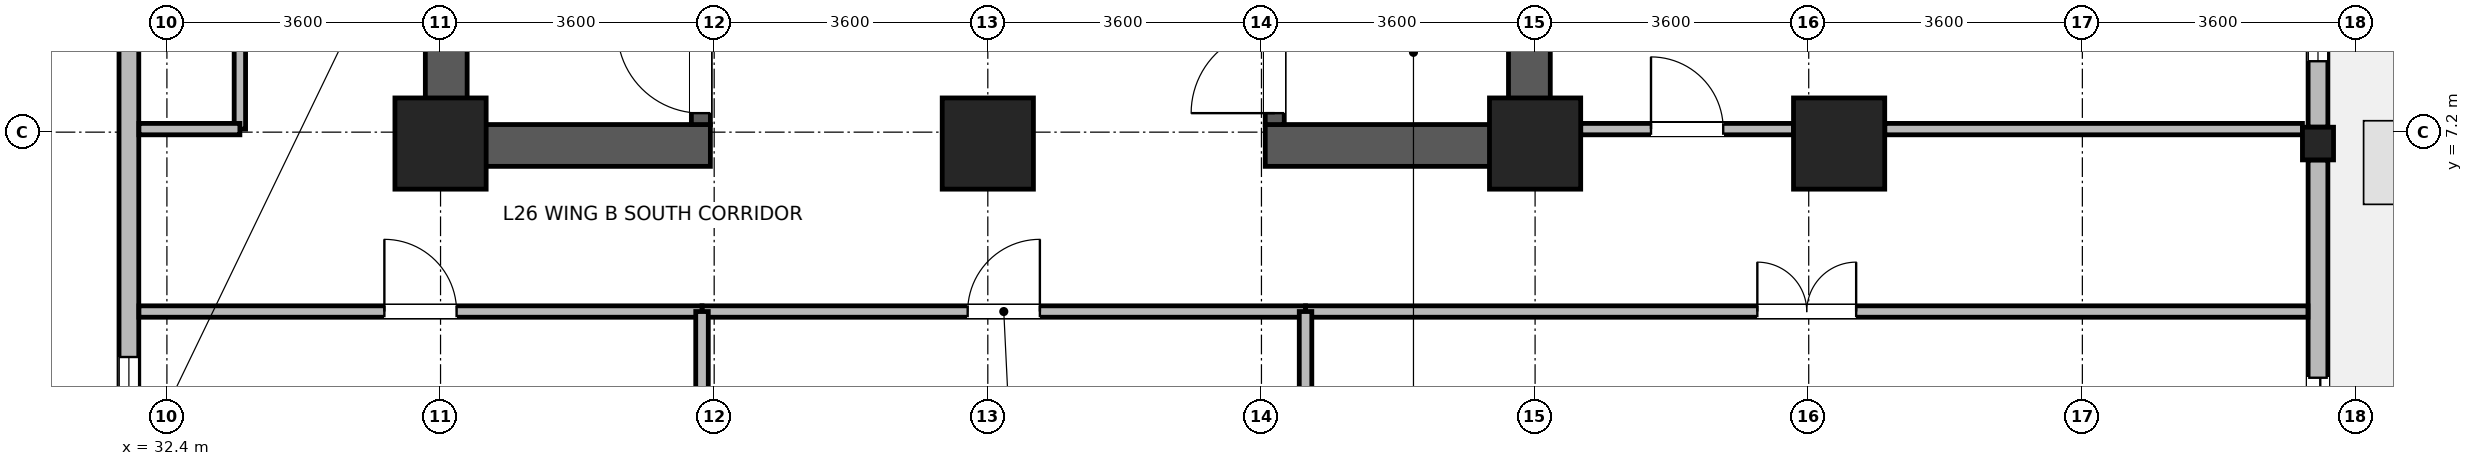
"""IFC4 building model, lengths in metres.
Left out: names, types, materials, properties, quantities, classifications, styles, units other than length and angle.
Written with IfcOpenShell. Run it as: python <this file> out.ifc"""

import sys

from ifc_helpers import new_model, si_unit, direction, frame, frame_2d, origin, origin_2d, place, context, subcontext, project, spatial, rectangle, i_section, extrude, source, transform, mapped, element, fill, save


model = new_model("IFC4")
c1 = context("Model", 3, precision=1e-05, world=origin(), true_north=direction((0.0, 1.0)))
c2 = subcontext(c1, "Body", "Model", "MODEL_VIEW")
j1 = project(units=[si_unit("LENGTHUNIT", "METRE"), si_unit("PLANEANGLEUNIT", "RADIAN")], contexts=[c1])
p1 = place(None, origin())
s1 = spatial("IfcSite", under=j1, at=p1, CompositionType="ELEMENT")
p2 = place(p1, origin())
s2 = spatial("IfcBuilding", under=s1, at=p2, CompositionType="ELEMENT")
p3 = place(p2, frame((0.0, 0.0, 104.5)))
s3 = spatial("IfcBuildingStorey", under=s2, at=p3, CompositionType="ELEMENT", Elevation=104.5)
for number, where, z_axis, x_axis in (
    (1, (36.075, 6.75, 0.0), (0.0, 0.0, 1.0), (0.0, 1.0, 0.0)),
    (2, (50.325, 6.75, 0.0), (0.0, 0.0, 1.0), (0.0, 1.0, 0.0)),
):
    element("IfcWall", number, at=place(p3, frame(where, z_axis=z_axis, x_axis=x_axis)), inside=s3, PredefinedType="SHEAR", context=c2, shape_type="SweptSolid", body=[
        extrude(rectangle(XDim=8.1, YDim=0.55, at=frame_2d((4.05, 0.0))), origin(), (0.0, 0.0, 1.0), 3.45),
    ])
for number, where, z_axis, x_axis in (
    (3, (36.35, 7.025, 0.0), (0.0, 0.0, 1.0), (1.0, 0.0, 0.0)),
    (4, (46.85, 7.025, 0.0), (0.0, 0.0, 1.0), (1.0, 0.0, 0.0)),
):
    element("IfcWall", number, at=place(p3, frame(where, z_axis=z_axis, x_axis=x_axis)), inside=s3, PredefinedType="SHEAR", context=c2, shape_type="SweptSolid", body=[
        extrude(rectangle(XDim=3.2, YDim=0.55, at=frame_2d((1.6, 0.0))), origin(), (0.0, 0.0, 1.0), 3.45),
    ])
p4 = place(p3, frame((39.425, 7.3, 0.0), z_axis=(0.0, 0.0, 1.0), x_axis=(0.0, 1.0, 0.0)))
e5 = element("IfcWall", 5, at=p4, inside=s3, PredefinedType="SHEAR", context=c2, shape_type="SweptSolid", body=[
    extrude(rectangle(XDim=7.0, YDim=0.25, at=frame_2d((3.5, 0.0))), origin(), (0.0, 0.0, 1.0), 3.45),
])
p5 = place(p4, frame((0.15, 0.0, 0.0)))
e6 = element("IfcOpeningElement", 6, at=p5, cuts=e5, PredefinedType="OPENING", context=c2, shape_type="SweptSolid", body=[
    extrude(rectangle(XDim=1.1, YDim=2.08, at=frame_2d((0.55, 1.04))), frame((0.0, 0.135, 0.0), z_axis=(0.0, -1.0, 0.0), x_axis=(1.0, 0.0, 0.0)), (0.0, 0.0, 1.0), 0.27),
])
p6 = place(p3, frame((46.975, 7.3, 0.0), z_axis=(0.0, 0.0, 1.0), x_axis=(0.0, 1.0, 0.0)))
e7 = element("IfcWall", 7, at=p6, inside=s3, PredefinedType="SHEAR", context=c2, shape_type="SweptSolid", body=[
    extrude(rectangle(XDim=7.0, YDim=0.25, at=frame_2d((3.5, 0.0))), origin(), (0.0, 0.0, 1.0), 3.45),
])
p7 = place(p6, frame((0.15, 0.0, 0.0)))
e8 = element("IfcOpeningElement", 8, at=p7, cuts=e7, PredefinedType="OPENING", context=c2, shape_type="SweptSolid", body=[
    extrude(rectangle(XDim=1.1, YDim=2.08, at=frame_2d((0.55, 1.04))), frame((0.0, 0.135, 0.0), z_axis=(0.0, -1.0, 0.0), x_axis=(1.0, 0.0, 0.0)), (0.0, 0.0, 1.0), 0.27),
])
m1 = source(origin(), c2, "Body", "SweptSolid", [
    extrude(rectangle(XDim=1.2, YDim=1.2, at=origin_2d()), origin(), (0.0, 0.0, 1.0), 3.7),
])
for number, where, z_axis, x_axis in (
    (9, (36.0, 7.05, 0.0), (0.0, 0.0, 1.0), (1.0, 0.0, 0.0)),
    (10, (43.2, 7.05, 0.0), (0.0, 0.0, 1.0), (1.0, 0.0, 0.0)),
    (11, (50.4, 7.05, 0.0), (0.0, 0.0, 1.0), (1.0, 0.0, 0.0)),
    (12, (54.4, 7.05, 0.0), (0.0, 0.0, 1.0), (1.0, 0.0, 0.0)),
):
    element("IfcColumn", number, at=place(p3, frame(where, z_axis=z_axis, x_axis=x_axis)), inside=s3, PredefinedType="COLUMN", context=c2, shape_type="MappedRepresentation", body=[
        mapped(m1, transform((0.0, 0.0, 0.0), x_axis=(1.0, 0.0, 0.0), y_axis=(0.0, 1.0, 0.0), z_axis=(0.0, 0.0, 1.0), scale=1.0)),
    ])
m2 = source(origin(), c2, "Body", "SweptSolid", [
    extrude(i_section(OverallWidth=0.409, OverallDepth=0.43, WebThickness=0.024, FlangeThickness=0.033, FilletRadius=0.015, at=origin_2d()), origin(), (0.0, 0.0, 1.0), 3.7),
])
p8 = place(p3, frame((60.7, 7.05, 0.0), z_axis=(0.0, 0.0, 1.0), x_axis=(1.0, 0.0, 0.0)))
e13 = element("IfcColumn", 13, at=p8, inside=s3, PredefinedType="COLUMN", context=c2, shape_type="MappedRepresentation", body=[
    mapped(m2, transform((0.0, 0.0, 0.0), x_axis=(1.0, 0.0, 0.0), y_axis=(0.0, 1.0, 0.0), z_axis=(0.0, 0.0, 1.0), scale=1.0)),
])
p9 = place(p3, frame((60.7, 6.834, 0.0), z_axis=(0.0, 0.0, 1.0), x_axis=(0.0, -1.0, 0.0)))
e14 = element("IfcWall", 14, at=p9, inside=s3, PredefinedType="STANDARD", context=c2, shape_type="SweptSolid", body=[
    extrude(rectangle(XDim=5.164, YDim=0.26, at=frame_2d((2.582, 0.0))), origin(), (0.0, 0.0, 1.0), 3.43),
])
p10 = place(p9, frame((2.865, 0.0, 0.0)))
e15 = element("IfcOpeningElement", 15, at=p10, cuts=e14, PredefinedType="OPENING", context=c2, shape_type="SweptSolid", body=[
    extrude(rectangle(XDim=1.5, YDim=2.15, at=frame_2d((0.75, 1.075))), frame((0.0, 0.14, 0.0), z_axis=(0.0, -1.0, 0.0), x_axis=(1.0, 0.0, 0.0)), (0.0, 0.0, 1.0), 0.28),
])
p11 = place(p3, frame((60.7, 14.334, 0.0), z_axis=(0.0, 0.0, 1.0), x_axis=(0.0, -1.0, 0.0)))
e16 = element("IfcWall", 16, at=p11, inside=s3, PredefinedType="STANDARD", context=c2, shape_type="SweptSolid", body=[
    extrude(rectangle(XDim=7.068, YDim=0.26, at=frame_2d((3.534, 0.0))), origin(), (0.0, 0.0, 1.0), 2.98),
])
p12 = place(p11, frame((0.867, 0.0, 0.85)))
e17 = element("IfcOpeningElement", 17, at=p12, cuts=e16, PredefinedType="OPENING", context=c2, shape_type="SweptSolid", body=[
    extrude(rectangle(XDim=1.8, YDim=1.85, at=frame_2d((0.9, 0.925))), frame((0.0, 0.14, 0.0), z_axis=(0.0, -1.0, 0.0), x_axis=(1.0, 0.0, 0.0)), (0.0, 0.0, 1.0), 0.28),
])
p13 = place(p11, frame((4.401, 0.0, 0.85)))
e18 = element("IfcOpeningElement", 18, at=p13, cuts=e16, PredefinedType="OPENING", context=c2, shape_type="SweptSolid", body=[
    extrude(rectangle(XDim=1.8, YDim=1.85, at=frame_2d((0.9, 0.925))), frame((0.0, 0.14, 0.0), z_axis=(0.0, -1.0, 0.0), x_axis=(1.0, 0.0, 0.0)), (0.0, 0.0, 1.0), 0.28),
])
p14 = place(p3, frame((31.9, 1.67, 0.0), z_axis=(0.0, 0.0, 1.0), x_axis=(0.0, 1.0, 0.0)))
e19 = element("IfcWall", 19, at=p14, inside=s3, PredefinedType="STANDARD", context=c2, shape_type="SweptSolid", body=[
    extrude(rectangle(XDim=20.06, YDim=0.26, at=frame_2d((10.03, 0.0))), origin(), (0.0, 0.0, 1.0), 3.43),
])
p15 = place(p14, frame((0.772, 0.0, 0.85)))
e20 = element("IfcOpeningElement", 20, at=p15, cuts=e19, PredefinedType="OPENING", context=c2, shape_type="SweptSolid", body=[
    extrude(rectangle(XDim=1.8, YDim=1.85, at=frame_2d((0.9, 0.925))), frame((0.0, 0.14, 0.0), z_axis=(0.0, -1.0, 0.0), x_axis=(1.0, 0.0, 0.0)), (0.0, 0.0, 1.0), 0.28),
])
p16 = place(p14, frame((7.458, 0.0, 0.85)))
e21 = element("IfcOpeningElement", 21, at=p16, cuts=e19, PredefinedType="OPENING", context=c2, shape_type="SweptSolid", body=[
    extrude(rectangle(XDim=1.8, YDim=1.85, at=frame_2d((0.9, 0.925))), frame((0.0, 0.14, 0.0), z_axis=(0.0, -1.0, 0.0), x_axis=(1.0, 0.0, 0.0)), (0.0, 0.0, 1.0), 0.28),
])
p17 = place(p14, frame((14.145, 0.0, 0.85)))
e22 = element("IfcOpeningElement", 22, at=p17, cuts=e19, PredefinedType="OPENING", context=c2, shape_type="SweptSolid", body=[
    extrude(rectangle(XDim=1.8, YDim=1.85, at=frame_2d((0.9, 0.925))), frame((0.0, 0.14, 0.0), z_axis=(0.0, -1.0, 0.0), x_axis=(1.0, 0.0, 0.0)), (0.0, 0.0, 1.0), 0.28),
])
p18 = place(p14, frame((17.488, 0.0, 0.85)))
e23 = element("IfcOpeningElement", 23, at=p18, cuts=e19, PredefinedType="OPENING", context=c2, shape_type="SweptSolid", body=[
    extrude(rectangle(XDim=1.8, YDim=1.85, at=frame_2d((0.9, 0.925))), frame((0.0, 0.14, 0.0), z_axis=(0.0, -1.0, 0.0), x_axis=(1.0, 0.0, 0.0)), (0.0, 0.0, 1.0), 0.28),
])
p19 = place(p3, frame((47.38, 4.84, 0.0), z_axis=(0.0, 0.0, 1.0), x_axis=(1.0, 0.0, 0.0)))
e24 = element("IfcWall", 24, at=p19, inside=s3, PredefinedType="PARTITIONING", context=c2, shape_type="SweptSolid", body=[
    extrude(rectangle(XDim=13.188, YDim=0.15, at=frame_2d((6.594, 0.0))), origin(), (0.0, 0.0, 1.0), 3.43),
])
p20 = place(p19, frame((5.944, 0.0, 0.0)))
e25 = element("IfcOpeningElement", 25, at=p20, cuts=e24, PredefinedType="OPENING", context=c2, shape_type="SweptSolid", body=[
    extrude(rectangle(XDim=1.3, YDim=2.12, at=frame_2d((0.65, 1.06))), frame((0.0, 0.085, 0.0), z_axis=(0.0, -1.0, 0.0), x_axis=(1.0, 0.0, 0.0)), (0.0, 0.0, 1.0), 0.17),
])
p21 = place(p3, frame((51.0, 7.24, 0.0), z_axis=(0.0, 0.0, 1.0), x_axis=(1.0, 0.0, 0.0)))
e26 = element("IfcWall", 26, at=p21, inside=s3, PredefinedType="PARTITIONING", context=c2, shape_type="SweptSolid", body=[
    extrude(rectangle(XDim=2.8, YDim=0.15, at=frame_2d((1.4, 0.0))), origin(), (0.0, 0.0, 1.0), 2.78),
])
p22 = place(p21, frame((0.925, 0.0, 0.0)))
e27 = element("IfcOpeningElement", 27, at=p22, cuts=e26, PredefinedType="OPENING", context=c2, shape_type="SweptSolid", body=[
    extrude(rectangle(XDim=0.95, YDim=2.1, at=frame_2d((0.475, 1.05))), frame((0.0, 0.085, 0.0), z_axis=(0.0, -1.0, 0.0), x_axis=(1.0, 0.0, 0.0)), (0.0, 0.0, 1.0), 0.17),
])
p23 = place(p3, frame((55.0, 7.24, 0.0), z_axis=(0.0, 0.0, 1.0), x_axis=(1.0, 0.0, 0.0)))
e28 = element("IfcWall", 28, at=p23, inside=s3, PredefinedType="PARTITIONING", context=c2, shape_type="SweptSolid", body=[
    extrude(rectangle(XDim=5.496, YDim=0.15, at=frame_2d((2.748, 0.0))), origin(), (0.0, 0.0, 1.0), 2.78),
])
p24 = place(p3, frame((39.44, 4.84, 0.0), z_axis=(0.0, 0.0, 1.0), x_axis=(1.0, 0.0, 0.0)))
e29 = element("IfcWall", 29, at=p24, inside=s3, PredefinedType="PARTITIONING", context=c2, shape_type="SweptSolid", body=[
    extrude(rectangle(XDim=7.94, YDim=0.15, at=frame_2d((3.97, 0.0))), origin(), (0.0, 0.0, 1.0), 3.43),
])
p25 = place(p24, frame((3.495, 0.0, 0.0)))
e30 = element("IfcOpeningElement", 30, at=p25, cuts=e29, PredefinedType="OPENING", context=c2, shape_type="SweptSolid", body=[
    extrude(rectangle(XDim=0.95, YDim=2.1, at=frame_2d((0.475, 1.05))), frame((0.0, 0.085, 0.0), z_axis=(0.0, -1.0, 0.0), x_axis=(1.0, 0.0, 0.0)), (0.0, 0.0, 1.0), 0.17),
])
p26 = place(p3, frame((32.032, 4.84, 0.0), z_axis=(0.0, 0.0, 1.0), x_axis=(1.0, 0.0, 0.0)))
e31 = element("IfcWall", 31, at=p26, inside=s3, PredefinedType="PARTITIONING", context=c2, shape_type="SweptSolid", body=[
    extrude(rectangle(XDim=7.408, YDim=0.15, at=frame_2d((3.704, 0.0))), origin(), (0.0, 0.0, 1.0), 3.43),
])
p27 = place(p26, frame((3.229, 0.0, 0.0)))
e32 = element("IfcOpeningElement", 32, at=p27, cuts=e31, PredefinedType="OPENING", context=c2, shape_type="SweptSolid", body=[
    extrude(rectangle(XDim=0.95, YDim=2.1, at=frame_2d((0.475, 1.05))), frame((0.0, 0.085, 0.0), z_axis=(0.0, -1.0, 0.0), x_axis=(1.0, 0.0, 0.0)), (0.0, 0.0, 1.0), 0.17),
])
p28 = place(p3, frame((33.36, 7.24, 0.0), z_axis=(0.0, 0.0, 1.0), x_axis=(0.0, 1.0, 0.0)))
e33 = element("IfcWall", 33, at=p28, inside=s3, PredefinedType="PARTITIONING", context=c2, shape_type="SweptSolid", body=[
    extrude(rectangle(XDim=7.26, YDim=0.15, at=frame_2d((3.63, 0.0))), origin(), (0.0, 0.0, 1.0), 3.43),
])
p29 = place(p28, frame((2.98, 0.0, 0.0)))
e34 = element("IfcOpeningElement", 34, at=p29, cuts=e33, PredefinedType="OPENING", context=c2, shape_type="SweptSolid", body=[
    extrude(rectangle(XDim=1.3, YDim=2.12, at=frame_2d((0.65, 1.06))), frame((0.0, 0.085, 0.0), z_axis=(0.0, -1.0, 0.0), x_axis=(1.0, 0.0, 0.0)), (0.0, 0.0, 1.0), 0.17),
])
p30 = place(p3, frame((32.032, 7.24, 0.0), z_axis=(0.0, 0.0, 1.0), x_axis=(1.0, 0.0, 0.0)))
e35 = element("IfcWall", 35, at=p30, inside=s3, PredefinedType="PARTITIONING", context=c2, shape_type="SweptSolid", body=[
    extrude(rectangle(XDim=1.328, YDim=0.15, at=frame_2d((0.664, 0.0))), origin(), (0.0, 0.0, 1.0), 3.43),
])
for number, where, z_axis, x_axis in (
    (36, (39.44, 1.932, 0.0), (0.0, 0.0, 1.0), (0.0, 1.0, 0.0)),
    (37, (47.38, 1.932, 0.0), (0.0, 0.0, 1.0), (0.0, 1.0, 0.0)),
):
    element("IfcWall", number, at=place(p3, frame(where, z_axis=z_axis, x_axis=x_axis)), inside=s3, PredefinedType="PARTITIONING", context=c2, shape_type="SweptSolid", body=[
        extrude(rectangle(XDim=2.908, YDim=0.165, at=frame_2d((1.454, 0.0))), origin(), (0.0, 0.0, 1.0), 3.43),
    ])
p31 = place(p10, origin())
e38 = element("IfcDoor", 38, at=p31, inside=s3, OperationType="SLIDING_TO_LEFT", PredefinedType="DOOR", context=c2, shape_type="SweptSolid", body=[
    extrude(rectangle(XDim=1.5, YDim=2.15, at=frame_2d((0.75, 1.075))), frame((0.0, 0.025, 0.0), z_axis=(0.0, -1.0, 0.0), x_axis=(1.0, 0.0, 0.0)), (0.0, 0.0, 1.0), 0.05),
])
fill(e15, e38)
p32 = place(p13, origin())
e39 = element("IfcWindow", 39, at=p32, inside=s3, PartitioningType="SINGLE_PANEL", PredefinedType="WINDOW", context=c2, shape_type="SweptSolid", body=[
    extrude(rectangle(XDim=1.8, YDim=1.85, at=frame_2d((0.9, 0.925))), frame((0.0, 0.03, 0.0), z_axis=(0.0, -1.0, 0.0), x_axis=(1.0, 0.0, 0.0)), (0.0, 0.0, 1.0), 0.06),
])
fill(e18, e39)
p33 = place(p15, origin())
e40 = element("IfcWindow", 40, at=p33, inside=s3, PartitioningType="SINGLE_PANEL", PredefinedType="WINDOW", context=c2, shape_type="SweptSolid", body=[
    extrude(rectangle(XDim=1.8, YDim=1.85, at=frame_2d((0.9, 0.925))), frame((0.0, 0.03, 0.0), z_axis=(0.0, -1.0, 0.0), x_axis=(1.0, 0.0, 0.0)), (0.0, 0.0, 1.0), 0.06),
])
fill(e20, e40)
p34 = place(p5, origin())
e41 = element("IfcDoor", 41, at=p34, inside=s3, OperationType="SINGLE_SWING_RIGHT", PredefinedType="DOOR", context=c2, shape_type="SweptSolid", body=[
    extrude(rectangle(XDim=1.1, YDim=2.08, at=frame_2d((0.55, 1.04))), frame((0.0, 0.025, 0.0), z_axis=(0.0, -1.0, 0.0), x_axis=(1.0, 0.0, 0.0)), (0.0, 0.0, 1.0), 0.05),
])
fill(e6, e41)
p35 = place(p7, origin())
e42 = element("IfcDoor", 42, at=p35, inside=s3, OperationType="SINGLE_SWING_LEFT", PredefinedType="DOOR", context=c2, shape_type="SweptSolid", body=[
    extrude(rectangle(XDim=1.1, YDim=2.08, at=frame_2d((0.55, 1.04))), frame((0.0, 0.025, 0.0), z_axis=(0.0, -1.0, 0.0), x_axis=(1.0, 0.0, 0.0)), (0.0, 0.0, 1.0), 0.05),
])
fill(e8, e42)
p36 = place(p20, origin())
e43 = element("IfcDoor", 43, at=p36, inside=s3, OperationType="DOUBLE_DOOR_SINGLE_SWING", PredefinedType="DOOR", context=c2, shape_type="SweptSolid", body=[
    extrude(rectangle(XDim=1.3, YDim=2.12, at=frame_2d((0.65, 1.06))), frame((0.0, 0.025, 0.0), z_axis=(0.0, -1.0, 0.0), x_axis=(1.0, 0.0, 0.0)), (0.0, 0.0, 1.0), 0.05),
])
fill(e25, e43)
p37 = place(p22, origin())
e44 = element("IfcDoor", 44, at=p37, inside=s3, OperationType="SINGLE_SWING_LEFT", PredefinedType="DOOR", context=c2, shape_type="SweptSolid", body=[
    extrude(rectangle(XDim=0.95, YDim=2.1, at=frame_2d((0.475, 1.05))), frame((0.0, 0.025, 0.0), z_axis=(0.0, -1.0, 0.0), x_axis=(1.0, 0.0, 0.0)), (0.0, 0.0, 1.0), 0.05),
])
fill(e27, e44)
p38 = place(p25, origin())
e45 = element("IfcDoor", 45, at=p38, inside=s3, OperationType="SINGLE_SWING_RIGHT", PredefinedType="DOOR", context=c2, shape_type="SweptSolid", body=[
    extrude(rectangle(XDim=0.95, YDim=2.1, at=frame_2d((0.475, 1.05))), frame((0.0, 0.025, 0.0), z_axis=(0.0, -1.0, 0.0), x_axis=(1.0, 0.0, 0.0)), (0.0, 0.0, 1.0), 0.05),
])
fill(e30, e45)
p39 = place(p27, origin())
e46 = element("IfcDoor", 46, at=p39, inside=s3, OperationType="SINGLE_SWING_LEFT", PredefinedType="DOOR", context=c2, shape_type="SweptSolid", body=[
    extrude(rectangle(XDim=0.95, YDim=2.1, at=frame_2d((0.475, 1.05))), frame((0.0, 0.025, 0.0), z_axis=(0.0, -1.0, 0.0), x_axis=(1.0, 0.0, 0.0)), (0.0, 0.0, 1.0), 0.05),
])
fill(e32, e46)
save(model, sys.argv[1])
